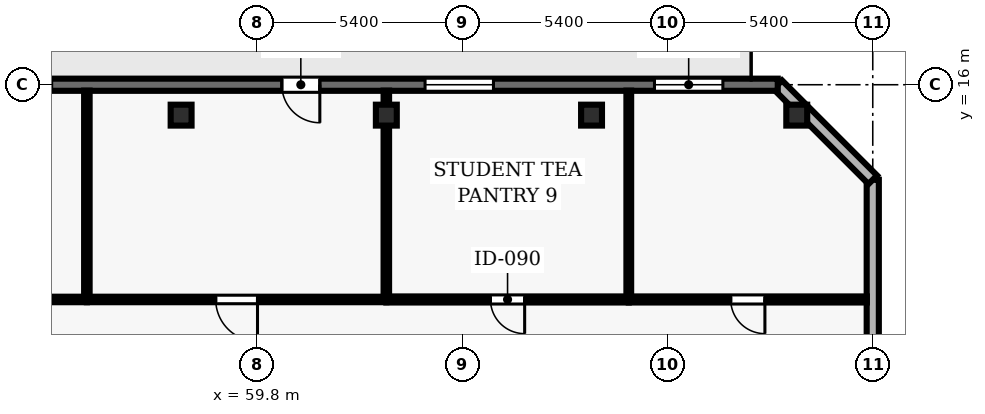
"""IFC4 building model, lengths in metres.
Left out: names, types, materials, properties, quantities, classifications, styles, units other than length and angle.
Written with IfcOpenShell. Run it as: python <this file> out.ifc"""

import sys

from ifc_helpers import new_model, si_unit, direction, frame, frame_2d, origin, origin_2d, place, context, subcontext, project, spatial, rectangle, hollow_rectangle, extrude, element, fill, save


model = new_model("IFC4")
c1 = context("Model", 3, precision=1e-05, world=origin(), true_north=direction((0.0, 1.0)))
c2 = subcontext(c1, "Body", "Model", "MODEL_VIEW")
j1 = project(units=[si_unit("LENGTHUNIT", "METRE"), si_unit("PLANEANGLEUNIT", "RADIAN")], contexts=[c1])
p1 = place(None, origin())
s1 = spatial("IfcSite", under=j1, at=p1, CompositionType="ELEMENT")
p2 = place(p1, origin())
s2 = spatial("IfcBuilding", under=s1, at=p2, CompositionType="ELEMENT")
p3 = place(p2, frame((0.0, 0.0, 62.2)))
s3 = spatial("IfcBuildingStorey", under=s2, at=p3, CompositionType="ELEMENT", Elevation=62.2)
for number, where, z_axis, x_axis in (
    (1, (57.8, 15.2, 0.0), (0.0, 0.0, 1.0), (1.0, 0.0, 0.0)),
    (2, (63.2, 15.2, 0.0), (0.0, 0.0, 1.0), (1.0, 0.0, 0.0)),
    (3, (68.6, 15.2, 0.0), (0.0, 0.0, 1.0), (1.0, 0.0, 0.0)),
    (4, (74.0, 15.2, 0.0), (0.0, 0.0, 1.0), (1.0, 0.0, 0.0)),
):
    element("IfcColumn", number, at=place(p3, frame(where, z_axis=z_axis, x_axis=x_axis)), inside=s3, PredefinedType="COLUMN", context=c2, shape_type="SweptSolid", body=[
        extrude(hollow_rectangle(XDim=0.55, YDim=0.55, WallThickness=0.025, at=origin_2d()), origin(), (0.0, 0.0, 1.0), 3.9),
    ])
p4 = place(p3, frame((76.0, 2.5, 0.0), z_axis=(0.0, 0.0, 1.0), x_axis=(0.0, 1.0, 0.0)))
e5 = element("IfcWall", 5, at=p4, inside=s3, PredefinedType="SOLIDWALL", context=c2, shape_type="SweptSolid", body=[
    extrude(rectangle(XDim=11.0, YDim=0.32, at=frame_2d((5.5, 0.0))), origin(), (0.0, 0.0, 1.0), 3.69),
])
p5 = place(p4, frame((1.55, 0.0, 0.9)))
e6 = element("IfcOpeningElement", 6, at=p5, cuts=e5, PredefinedType="OPENING", context=c2, shape_type="SweptSolid", body=[
    extrude(rectangle(XDim=2.4, YDim=1.6, at=frame_2d((1.2, 0.8))), frame((0.0, 0.17, 0.0), z_axis=(0.0, -1.0, 0.0), x_axis=(1.0, 0.0, 0.0)), (0.0, 0.0, 1.0), 0.34),
])
p6 = place(p3, frame((76.0, 13.5, 0.0), z_axis=(0.0, 0.0, 1.0), x_axis=(-0.707106781187, 0.707106781187, 0.0)))
e7 = element("IfcWall", 7, at=p6, inside=s3, PredefinedType="SOLIDWALL", context=c2, shape_type="SweptSolid", body=[
    extrude(rectangle(XDim=3.536, YDim=0.32, at=frame_2d((1.768, 0.0))), origin(), (0.0, 0.0, 1.0), 3.69),
])
p7 = place(p3, frame((73.5, 16.0, 0.0), z_axis=(0.0, 0.0, 1.0), x_axis=(-1.0, 0.0, 0.0)))
e8 = element("IfcWall", 8, at=p7, inside=s3, PredefinedType="SOLIDWALL", context=c2, shape_type="SweptSolid", body=[
    extrude(rectangle(XDim=22.35, YDim=0.32, at=frame_2d((11.175, 0.0))), origin(), (0.0, 0.0, 1.0), 3.69),
])
p8 = place(p7, frame((12.05, 0.0, 0.0)))
e9 = element("IfcOpeningElement", 9, at=p8, cuts=e8, PredefinedType="OPENING", context=c2, shape_type="SweptSolid", body=[
    extrude(rectangle(XDim=1.0, YDim=2.2, at=frame_2d((0.5, 1.1))), frame((0.0, 0.17, 0.0), z_axis=(0.0, -1.0, 0.0), x_axis=(1.0, 0.0, 0.0)), (0.0, 0.0, 1.0), 0.34),
])
p9 = place(p7, frame((1.444, 0.0, 0.9)))
e10 = element("IfcOpeningElement", 10, at=p9, cuts=e8, PredefinedType="OPENING", context=c2, shape_type="SweptSolid", body=[
    extrude(rectangle(XDim=1.8, YDim=1.8, at=frame_2d((0.9, 0.9))), frame((0.0, 0.17, 0.0), z_axis=(0.0, -1.0, 0.0), x_axis=(1.0, 0.0, 0.0)), (0.0, 0.0, 1.0), 0.34),
])
p10 = place(p7, frame((7.481, 0.0, 0.9)))
e11 = element("IfcOpeningElement", 11, at=p10, cuts=e8, PredefinedType="OPENING", context=c2, shape_type="SweptSolid", body=[
    extrude(rectangle(XDim=1.8, YDim=1.8, at=frame_2d((0.9, 0.9))), frame((0.0, 0.17, 0.0), z_axis=(0.0, -1.0, 0.0), x_axis=(1.0, 0.0, 0.0)), (0.0, 0.0, 1.0), 0.34),
])
p11 = place(p7, frame((19.106, 0.0, 0.9)))
e12 = element("IfcOpeningElement", 12, at=p11, cuts=e8, PredefinedType="OPENING", context=c2, shape_type="SweptSolid", body=[
    extrude(rectangle(XDim=1.8, YDim=1.8, at=frame_2d((0.9, 0.9))), frame((0.0, 0.17, 0.0), z_axis=(0.0, -1.0, 0.0), x_axis=(1.0, 0.0, 0.0)), (0.0, 0.0, 1.0), 0.34),
])
p12 = place(p3, frame((55.32, 10.35, 0.0), z_axis=(0.0, 0.0, 1.0), x_axis=(-1.0, 0.0, 0.0)))
e13 = element("IfcWall", 13, at=p12, inside=s3, PredefinedType="PARTITIONING", context=c2, shape_type="SweptSolid", body=[
    extrude(rectangle(XDim=7.48, YDim=0.145, at=frame_2d((3.74, 0.0))), origin(), (0.0, 0.0, 1.0), 3.227),
])
p13 = place(p12, frame((3.19, 0.0, 0.0)))
e14 = element("IfcOpeningElement", 14, at=p13, cuts=e13, PredefinedType="OPENING", context=c2, shape_type="SweptSolid", body=[
    extrude(rectangle(XDim=1.1, YDim=2.15, at=frame_2d((0.55, 1.075))), frame((0.0, 0.083, 0.0), z_axis=(0.0, -1.0, 0.0), x_axis=(1.0, 0.0, 0.0)), (0.0, 0.0, 1.0), 0.165),
])
p14 = place(p3, frame((63.2, 10.35, 0.0), z_axis=(0.0, 0.0, 1.0), x_axis=(-1.0, 0.0, 0.0)))
e15 = element("IfcWall", 15, at=p14, inside=s3, PredefinedType="PARTITIONING", context=c2, shape_type="SweptSolid", body=[
    extrude(rectangle(XDim=7.88, YDim=0.145, at=frame_2d((3.94, 0.0))), origin(), (0.0, 0.0, 1.0), 3.227),
])
p15 = place(p14, frame((3.39, 0.0, 0.0)))
e16 = element("IfcOpeningElement", 16, at=p15, cuts=e15, PredefinedType="OPENING", context=c2, shape_type="SweptSolid", body=[
    extrude(rectangle(XDim=1.1, YDim=2.15, at=frame_2d((0.55, 1.075))), frame((0.0, 0.083, 0.0), z_axis=(0.0, -1.0, 0.0), x_axis=(1.0, 0.0, 0.0)), (0.0, 0.0, 1.0), 0.165),
])
p16 = place(p3, frame((69.58, 10.35, 0.0), z_axis=(0.0, 0.0, 1.0), x_axis=(-1.0, 0.0, 0.0)))
e17 = element("IfcWall", 17, at=p16, inside=s3, PredefinedType="PARTITIONING", context=c2, shape_type="SweptSolid", body=[
    extrude(rectangle(XDim=6.38, YDim=0.16, at=frame_2d((3.19, 0.0))), origin(), (0.0, 0.0, 1.0), 3.227),
])
p17 = place(p16, frame((2.74, 0.0, 0.0)))
e18 = element("IfcOpeningElement", 18, at=p17, cuts=e17, PredefinedType="OPENING", context=c2, shape_type="SweptSolid", body=[
    extrude(rectangle(XDim=0.9, YDim=2.1, at=frame_2d((0.45, 1.05))), frame((0.0, 0.09, 0.0), z_axis=(0.0, -1.0, 0.0), x_axis=(1.0, 0.0, 0.0)), (0.0, 0.0, 1.0), 0.18),
])
p18 = place(p3, frame((75.845, 10.35, 0.0), z_axis=(0.0, 0.0, 1.0), x_axis=(-1.0, 0.0, 0.0)))
e19 = element("IfcWall", 19, at=p18, inside=s3, PredefinedType="PARTITIONING", context=c2, shape_type="SweptSolid", body=[
    extrude(rectangle(XDim=6.265, YDim=0.16, at=frame_2d((3.132, 0.0))), origin(), (0.0, 0.0, 1.0), 3.69),
])
p19 = place(p18, frame((2.683, 0.0, 0.0)))
e20 = element("IfcOpeningElement", 20, at=p19, cuts=e19, PredefinedType="OPENING", context=c2, shape_type="SweptSolid", body=[
    extrude(rectangle(XDim=0.9, YDim=2.1, at=frame_2d((0.45, 1.05))), frame((0.0, 0.09, 0.0), z_axis=(0.0, -1.0, 0.0), x_axis=(1.0, 0.0, 0.0)), (0.0, 0.0, 1.0), 0.18),
])
p20 = place(p3, frame((55.32, 10.418, 0.0), z_axis=(0.0, 0.0, 1.0), x_axis=(0.0, 1.0, 0.0)))
e21 = element("IfcWall", 21, at=p20, inside=s3, PredefinedType="PARTITIONING", context=c2, shape_type="SweptSolid", body=[
    extrude(rectangle(XDim=5.427, YDim=0.145, at=frame_2d((2.713, 0.0))), origin(), (0.0, 0.0, 1.0), 3.69),
])
p21 = place(p3, frame((63.2, 10.425, 0.0), z_axis=(0.0, 0.0, 1.0), x_axis=(0.0, 1.0, 0.0)))
e22 = element("IfcWall", 22, at=p21, inside=s3, PredefinedType="PARTITIONING", context=c2, shape_type="SweptSolid", body=[
    extrude(rectangle(XDim=5.42, YDim=0.145, at=frame_2d((2.71, 0.0))), origin(), (0.0, 0.0, 1.0), 2.995),
])
p22 = place(p3, frame((69.58, 10.425, 0.0), z_axis=(0.0, 0.0, 1.0), x_axis=(0.0, 1.0, 0.0)))
e23 = element("IfcWall", 23, at=p22, inside=s3, PredefinedType="PARTITIONING", context=c2, shape_type="SweptSolid", body=[
    extrude(rectangle(XDim=5.42, YDim=0.125, at=frame_2d((2.71, 0.0))), origin(), (0.0, 0.0, 1.0), 3.69),
])
p23 = place(p8, origin())
e24 = element("IfcDoor", 24, at=p23, inside=s3, OperationType="SINGLE_SWING_LEFT", PredefinedType="DOOR", context=c2, shape_type="SweptSolid", body=[
    extrude(rectangle(XDim=1.0, YDim=2.2, at=frame_2d((0.5, 1.1))), frame((0.0, 0.025, 0.0), z_axis=(0.0, -1.0, 0.0), x_axis=(1.0, 0.0, 0.0)), (0.0, 0.0, 1.0), 0.05),
])
fill(e9, e24)
p24 = place(p9, origin())
e25 = element("IfcWindow", 25, at=p24, inside=s3, PartitioningType="SINGLE_PANEL", PredefinedType="WINDOW", context=c2, shape_type="SweptSolid", body=[
    extrude(rectangle(XDim=1.8, YDim=1.8, at=frame_2d((0.9, 0.9))), frame((0.0, 0.03, 0.0), z_axis=(0.0, -1.0, 0.0), x_axis=(1.0, 0.0, 0.0)), (0.0, 0.0, 1.0), 0.06),
])
fill(e10, e25)
p25 = place(p10, origin())
e26 = element("IfcWindow", 26, at=p25, inside=s3, PartitioningType="SINGLE_PANEL", PredefinedType="WINDOW", context=c2, shape_type="SweptSolid", body=[
    extrude(rectangle(XDim=1.8, YDim=1.8, at=frame_2d((0.9, 0.9))), frame((0.0, 0.03, 0.0), z_axis=(0.0, -1.0, 0.0), x_axis=(1.0, 0.0, 0.0)), (0.0, 0.0, 1.0), 0.06),
])
fill(e11, e26)
p26 = place(p15, origin())
e27 = element("IfcDoor", 27, at=p26, inside=s3, OperationType="SINGLE_SWING_LEFT", PredefinedType="DOOR", context=c2, shape_type="SweptSolid", body=[
    extrude(rectangle(XDim=1.1, YDim=2.15, at=frame_2d((0.55, 1.075))), frame((0.0, 0.025, 0.0), z_axis=(0.0, -1.0, 0.0), x_axis=(1.0, 0.0, 0.0)), (0.0, 0.0, 1.0), 0.05),
])
fill(e16, e27)
p27 = place(p17, origin())
e28 = element("IfcDoor", 28, at=p27, inside=s3, OperationType="SINGLE_SWING_LEFT", PredefinedType="DOOR", context=c2, shape_type="SweptSolid", body=[
    extrude(rectangle(XDim=0.9, YDim=2.1, at=frame_2d((0.45, 1.05))), frame((0.0, 0.025, 0.0), z_axis=(0.0, -1.0, 0.0), x_axis=(1.0, 0.0, 0.0)), (0.0, 0.0, 1.0), 0.05),
])
fill(e18, e28)
p28 = place(p19, origin())
e29 = element("IfcDoor", 29, at=p28, inside=s3, OperationType="SINGLE_SWING_LEFT", PredefinedType="DOOR", context=c2, shape_type="SweptSolid", body=[
    extrude(rectangle(XDim=0.9, YDim=2.1, at=frame_2d((0.45, 1.05))), frame((0.0, 0.025, 0.0), z_axis=(0.0, -1.0, 0.0), x_axis=(1.0, 0.0, 0.0)), (0.0, 0.0, 1.0), 0.05),
])
fill(e20, e29)
save(model, sys.argv[1])
